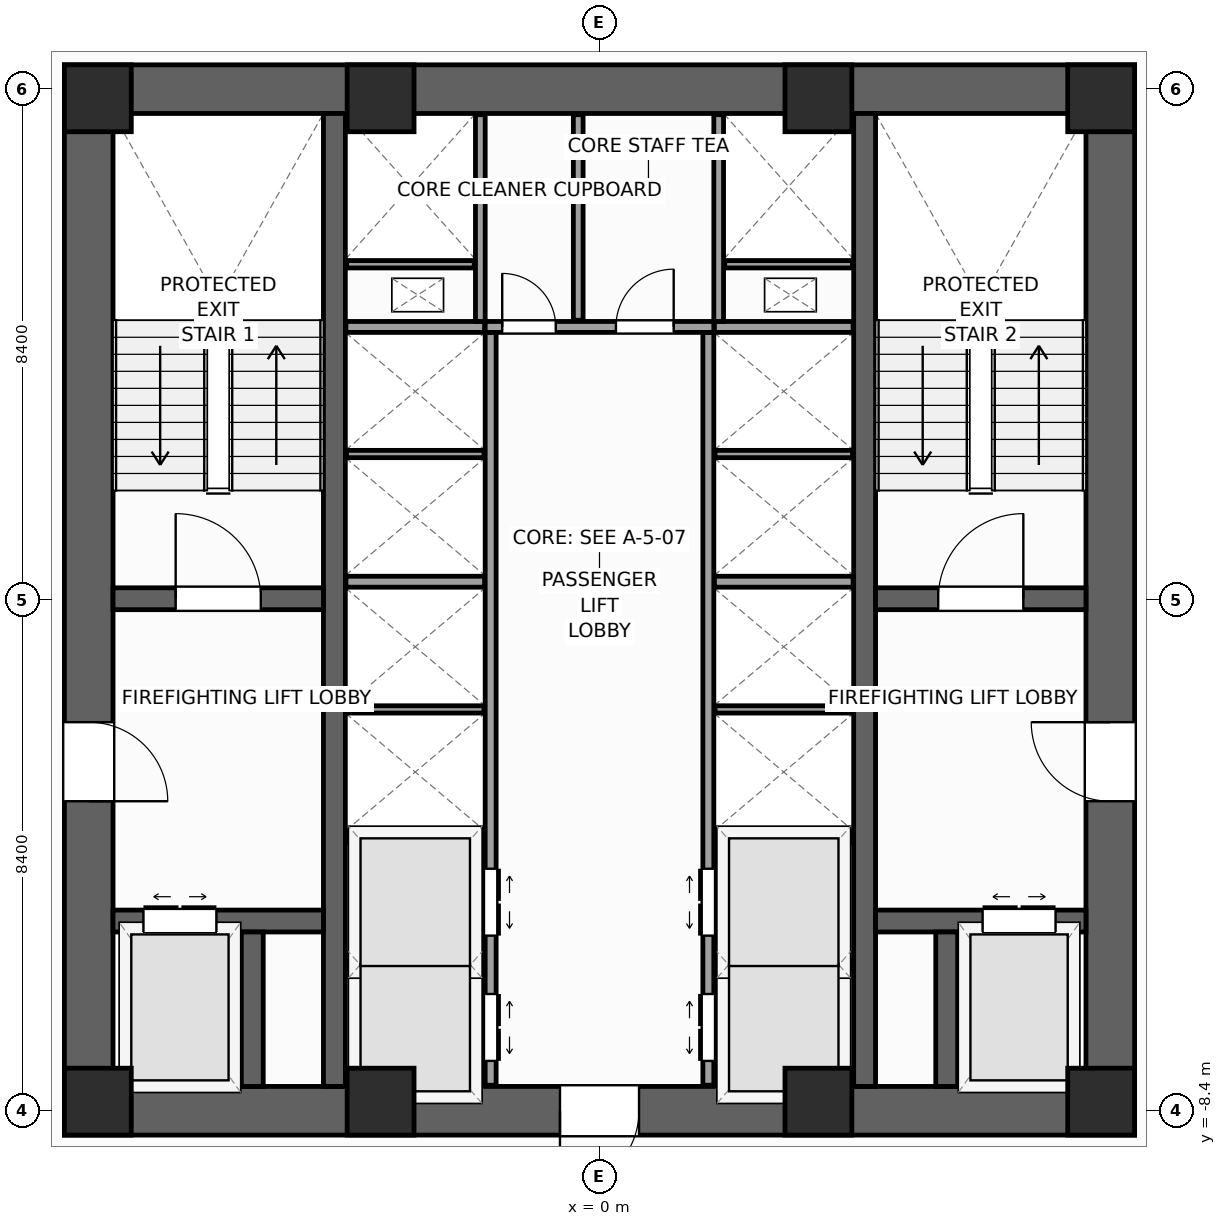
"""IFC4 building model, lengths in metres.
Left out: names, types, materials, properties, quantities, classifications, styles, units other than length and angle.
Written with IfcOpenShell. Run it as: python <this file> out.ifc"""

import sys

from ifc_helpers import new_model, si_unit, direction, frame, frame_2d, origin, origin_2d, place, context, subcontext, project, spatial, rectangle, extrude, source, transform, mapped, element, fill, save


model = new_model("IFC4")
c1 = context("Model", 3, precision=1e-05, world=origin(), true_north=direction((0.0, 1.0)))
c2 = subcontext(c1, "Body", "Model", "MODEL_VIEW")
j1 = project(units=[si_unit("LENGTHUNIT", "METRE"), si_unit("PLANEANGLEUNIT", "RADIAN")], contexts=[c1])
p1 = place(None, origin())
s1 = spatial("IfcSite", under=j1, at=p1, CompositionType="ELEMENT")
p2 = place(p1, origin())
s2 = spatial("IfcBuilding", under=s1, at=p2, CompositionType="ELEMENT")
p3 = place(p2, frame((0.0, 0.0, 74.0)))
s3 = spatial("IfcBuildingStorey", under=s2, at=p3, CompositionType="ELEMENT", Elevation=74.0)
p4 = place(p3, frame((-8.8, -8.4, 0.0), z_axis=(0.0, 0.0, 1.0), x_axis=(1.0, 0.0, 0.0)))
e1 = element("IfcWall", 1, at=p4, inside=s3, PredefinedType="SHEAR", context=c2, shape_type="SweptSolid", body=[
    extrude(rectangle(XDim=17.6, YDim=0.8, at=frame_2d((8.8, 0.0))), origin(), (0.0, 0.0, 1.0), 4.0),
])
p5 = place(p4, frame((8.15, 0.0, 0.0)))
e2 = element("IfcOpeningElement", 2, at=p5, cuts=e1, PredefinedType="OPENING", context=c2, shape_type="SweptSolid", body=[
    extrude(rectangle(XDim=1.3, YDim=2.2, at=frame_2d((0.65, 1.1))), frame((0.0, 0.41, 0.0), z_axis=(0.0, -1.0, 0.0), x_axis=(1.0, 0.0, 0.0)), (0.0, 0.0, 1.0), 0.82),
])
p6 = place(p3, frame((-8.8, 8.4, 0.0), z_axis=(0.0, 0.0, 1.0), x_axis=(1.0, 0.0, 0.0)))
e3 = element("IfcWall", 3, at=p6, inside=s3, PredefinedType="SHEAR", context=c2, shape_type="SweptSolid", body=[
    extrude(rectangle(XDim=17.6, YDim=0.8, at=frame_2d((8.8, 0.0))), origin(), (0.0, 0.0, 1.0), 4.0),
])
p7 = place(p3, frame((-8.4, -8.0, 0.0), z_axis=(0.0, 0.0, 1.0), x_axis=(0.0, 1.0, 0.0)))
e4 = element("IfcWall", 4, at=p7, inside=s3, PredefinedType="SHEAR", context=c2, shape_type="SweptSolid", body=[
    extrude(rectangle(XDim=16.0, YDim=0.8, at=frame_2d((8.0, 0.0))), origin(), (0.0, 0.0, 1.0), 4.0),
])
p8 = place(p7, frame((4.69, 0.0, 0.0)))
e5 = element("IfcOpeningElement", 5, at=p8, cuts=e4, PredefinedType="OPENING", context=c2, shape_type="SweptSolid", body=[
    extrude(rectangle(XDim=1.3, YDim=2.2, at=frame_2d((0.65, 1.1))), frame((0.0, 0.41, 0.0), z_axis=(0.0, -1.0, 0.0), x_axis=(1.0, 0.0, 0.0)), (0.0, 0.0, 1.0), 0.82),
])
p9 = place(p3, frame((8.4, -8.0, 0.0), z_axis=(0.0, 0.0, 1.0), x_axis=(0.0, 1.0, 0.0)))
e6 = element("IfcWall", 6, at=p9, inside=s3, PredefinedType="SHEAR", context=c2, shape_type="SweptSolid", body=[
    extrude(rectangle(XDim=16.0, YDim=0.8, at=frame_2d((8.0, 0.0))), origin(), (0.0, 0.0, 1.0), 4.0),
])
p10 = place(p9, frame((4.69, 0.0, 0.0)))
e7 = element("IfcOpeningElement", 7, at=p10, cuts=e6, PredefinedType="OPENING", context=c2, shape_type="SweptSolid", body=[
    extrude(rectangle(XDim=1.3, YDim=2.2, at=frame_2d((0.65, 1.1))), frame((0.0, 0.41, 0.0), z_axis=(0.0, -1.0, 0.0), x_axis=(1.0, 0.0, 0.0)), (0.0, 0.0, 1.0), 0.82),
])
for number, where, z_axis, x_axis in (
    (8, (-4.36, -8.0, 0.0), (0.0, 0.0, 1.0), (0.0, 1.0, 0.0)),
    (9, (4.36, -8.0, 0.0), (0.0, 0.0, 1.0), (0.0, 1.0, 0.0)),
):
    element("IfcWall", number, at=place(p3, frame(where, z_axis=z_axis, x_axis=x_axis)), inside=s3, PredefinedType="SHEAR", context=c2, shape_type="SweptSolid", body=[
        extrude(rectangle(XDim=16.0, YDim=0.36, at=frame_2d((8.0, 0.0))), origin(), (0.0, 0.0, 1.0), 4.0),
    ])
p11 = place(p3, frame((-8.0, 0.02, 0.0), z_axis=(0.0, 0.0, 1.0), x_axis=(1.0, 0.0, 0.0)))
e10 = element("IfcWall", 10, at=p11, inside=s3, PredefinedType="SHEAR", context=c2, shape_type="SweptSolid", body=[
    extrude(rectangle(XDim=3.46, YDim=0.36, at=frame_2d((1.73, 0.0))), origin(), (0.0, 0.0, 1.0), 4.0),
])
p12 = place(p11, frame((1.03, 0.0, 0.0)))
e11 = element("IfcOpeningElement", 11, at=p12, cuts=e10, PredefinedType="OPENING", context=c2, shape_type="SweptSolid", body=[
    extrude(rectangle(XDim=1.4, YDim=2.2, at=frame_2d((0.7, 1.1))), frame((0.0, 0.19, 0.0), z_axis=(0.0, -1.0, 0.0), x_axis=(1.0, 0.0, 0.0)), (0.0, 0.0, 1.0), 0.38),
])
p13 = place(p3, frame((4.54, 0.02, 0.0), z_axis=(0.0, 0.0, 1.0), x_axis=(1.0, 0.0, 0.0)))
e12 = element("IfcWall", 12, at=p13, inside=s3, PredefinedType="SHEAR", context=c2, shape_type="SweptSolid", body=[
    extrude(rectangle(XDim=3.46, YDim=0.36, at=frame_2d((1.73, 0.0))), origin(), (0.0, 0.0, 1.0), 4.0),
])
p14 = place(p13, frame((1.03, 0.0, 0.0)))
e13 = element("IfcOpeningElement", 13, at=p14, cuts=e12, PredefinedType="OPENING", context=c2, shape_type="SweptSolid", body=[
    extrude(rectangle(XDim=1.4, YDim=2.2, at=frame_2d((0.7, 1.1))), frame((0.0, 0.19, 0.0), z_axis=(0.0, -1.0, 0.0), x_axis=(1.0, 0.0, 0.0)), (0.0, 0.0, 1.0), 0.38),
])
p15 = place(p3, frame((-8.0, -5.28, 0.0), z_axis=(0.0, 0.0, 1.0), x_axis=(1.0, 0.0, 0.0)))
e14 = element("IfcWall", 14, at=p15, inside=s3, PredefinedType="SHEAR", context=c2, shape_type="SweptSolid", body=[
    extrude(rectangle(XDim=3.46, YDim=0.36, at=frame_2d((1.73, 0.0))), origin(), (0.0, 0.0, 1.0), 4.0),
])
p16 = place(p15, frame((0.5, 0.0, 0.0)))
e15 = element("IfcOpeningElement", 15, at=p16, cuts=e14, PredefinedType="OPENING", context=c2, shape_type="SweptSolid", body=[
    extrude(rectangle(XDim=1.2, YDim=2.25, at=frame_2d((0.6, 1.125))), frame((0.0, 0.19, 0.0), z_axis=(0.0, -1.0, 0.0), x_axis=(1.0, 0.0, 0.0)), (0.0, 0.0, 1.0), 0.38),
])
p17 = place(p3, frame((4.54, -5.28, 0.0), z_axis=(0.0, 0.0, 1.0), x_axis=(1.0, 0.0, 0.0)))
e16 = element("IfcWall", 16, at=p17, inside=s3, PredefinedType="SHEAR", context=c2, shape_type="SweptSolid", body=[
    extrude(rectangle(XDim=3.46, YDim=0.36, at=frame_2d((1.73, 0.0))), origin(), (0.0, 0.0, 1.0), 4.0),
])
p18 = place(p17, frame((1.76, 0.0, 0.0)))
e17 = element("IfcOpeningElement", 17, at=p18, cuts=e16, PredefinedType="OPENING", context=c2, shape_type="SweptSolid", body=[
    extrude(rectangle(XDim=1.2, YDim=2.25, at=frame_2d((0.6, 1.125))), frame((0.0, 0.19, 0.0), z_axis=(0.0, -1.0, 0.0), x_axis=(1.0, 0.0, 0.0)), (0.0, 0.0, 1.0), 0.38),
])
for number, where, z_axis, x_axis in (
    (18, (-5.71, -8.0, 0.0), (0.0, 0.0, 1.0), (0.0, 1.0, 0.0)),
    (19, (5.71, -8.0, 0.0), (0.0, 0.0, 1.0), (0.0, 1.0, 0.0)),
):
    element("IfcWall", number, at=place(p3, frame(where, z_axis=z_axis, x_axis=x_axis)), inside=s3, PredefinedType="SHEAR", context=c2, shape_type="SweptSolid", body=[
        extrude(rectangle(XDim=2.54, YDim=0.36, at=frame_2d((1.27, 0.0))), origin(), (0.0, 0.0, 1.0), 4.0),
    ])
m1 = source(origin(), c2, "Body", "SweptSolid", [
    extrude(rectangle(XDim=1.1, YDim=1.1, at=origin_2d()), origin(), (0.0, 0.0, 1.0), 4.0),
])
for number, where, z_axis, x_axis in (
    (20, (-8.25, -8.25, 0.0), (0.0, 0.0, 1.0), (1.0, 0.0, 0.0)),
    (21, (8.25, -8.25, 0.0), (0.0, 0.0, 1.0), (1.0, 0.0, 0.0)),
    (22, (8.25, 8.25, 0.0), (0.0, 0.0, 1.0), (1.0, 0.0, 0.0)),
    (23, (-8.25, 8.25, 0.0), (0.0, 0.0, 1.0), (1.0, 0.0, 0.0)),
    (24, (-3.6, -8.25, 0.0), (0.0, 0.0, 1.0), (1.0, 0.0, 0.0)),
    (25, (3.6, -8.25, 0.0), (0.0, 0.0, 1.0), (1.0, 0.0, 0.0)),
    (26, (-3.6, 8.25, 0.0), (0.0, 0.0, 1.0), (1.0, 0.0, 0.0)),
    (27, (3.6, 8.25, 0.0), (0.0, 0.0, 1.0), (1.0, 0.0, 0.0)),
):
    element("IfcColumn", number, at=place(p3, frame(where, z_axis=z_axis, x_axis=x_axis)), inside=s3, PredefinedType="PILASTER", context=c2, shape_type="MappedRepresentation", body=[
        mapped(m1, transform((0.0, 0.0, 0.0), scale=1.0)),
    ])
p19 = place(p3, frame((-1.79, -7.98, 0.0), z_axis=(0.0, 0.0, 1.0), x_axis=(0.0, 1.0, 0.0)))
e28 = element("IfcWall", 28, at=p19, inside=s3, PredefinedType="PARTITIONING", context=c2, shape_type="SweptSolid", body=[
    extrude(rectangle(XDim=12.38, YDim=0.18, at=frame_2d((6.19, 0.0))), origin(), (0.0, 0.0, 1.0), 3.6),
])
p20 = place(p19, frame((0.4, 0.0, 0.0)))
e29 = element("IfcOpeningElement", 29, at=p20, cuts=e28, PredefinedType="OPENING", context=c2, shape_type="SweptSolid", body=[
    extrude(rectangle(XDim=1.1, YDim=2.2, at=frame_2d((0.55, 1.1))), frame((0.0, 0.1, 0.0), z_axis=(0.0, -1.0, 0.0), x_axis=(1.0, 0.0, 0.0)), (0.0, 0.0, 1.0), 0.2),
])
p21 = place(p19, frame((2.46, 0.0, 0.0)))
e30 = element("IfcOpeningElement", 30, at=p21, cuts=e28, PredefinedType="OPENING", context=c2, shape_type="SweptSolid", body=[
    extrude(rectangle(XDim=1.1, YDim=2.2, at=frame_2d((0.55, 1.1))), frame((0.0, 0.1, 0.0), z_axis=(0.0, -1.0, 0.0), x_axis=(1.0, 0.0, 0.0)), (0.0, 0.0, 1.0), 0.2),
])
p22 = place(p3, frame((1.79, -7.98, 0.0), z_axis=(0.0, 0.0, 1.0), x_axis=(0.0, 1.0, 0.0)))
e31 = element("IfcWall", 31, at=p22, inside=s3, PredefinedType="PARTITIONING", context=c2, shape_type="SweptSolid", body=[
    extrude(rectangle(XDim=12.38, YDim=0.18, at=frame_2d((6.19, 0.0))), origin(), (0.0, 0.0, 1.0), 3.6),
])
p23 = place(p22, frame((0.4, 0.0, 0.0)))
e32 = element("IfcOpeningElement", 32, at=p23, cuts=e31, PredefinedType="OPENING", context=c2, shape_type="SweptSolid", body=[
    extrude(rectangle(XDim=1.1, YDim=2.2, at=frame_2d((0.55, 1.1))), frame((0.0, 0.1, 0.0), z_axis=(0.0, -1.0, 0.0), x_axis=(1.0, 0.0, 0.0)), (0.0, 0.0, 1.0), 0.2),
])
p24 = place(p22, frame((2.46, 0.0, 0.0)))
e33 = element("IfcOpeningElement", 33, at=p24, cuts=e31, PredefinedType="OPENING", context=c2, shape_type="SweptSolid", body=[
    extrude(rectangle(XDim=1.1, YDim=2.2, at=frame_2d((0.55, 1.1))), frame((0.0, 0.1, 0.0), z_axis=(0.0, -1.0, 0.0), x_axis=(1.0, 0.0, 0.0)), (0.0, 0.0, 1.0), 0.2),
])
p25 = place(p3, frame((-1.88, 4.49, 0.0), z_axis=(0.0, 0.0, 1.0), x_axis=(1.0, 0.0, 0.0)))
e34 = element("IfcWall", 34, at=p25, inside=s3, PredefinedType="PARTITIONING", context=c2, shape_type="SweptSolid", body=[
    extrude(rectangle(XDim=3.76, YDim=0.18, at=frame_2d((1.88, 0.0))), origin(), (0.0, 0.0, 1.0), 3.6),
])
p26 = place(p25, frame((0.28, 0.0, 0.0)))
e35 = element("IfcOpeningElement", 35, at=p26, cuts=e34, PredefinedType="OPENING", context=c2, shape_type="SweptSolid", body=[
    extrude(rectangle(XDim=0.88, YDim=2.1, at=frame_2d((0.44, 1.05))), frame((0.0, 0.1, 0.0), z_axis=(0.0, -1.0, 0.0), x_axis=(1.0, 0.0, 0.0)), (0.0, 0.0, 1.0), 0.2),
])
p27 = place(p25, frame((2.15, 0.0, 0.0)))
e36 = element("IfcOpeningElement", 36, at=p27, cuts=e34, PredefinedType="OPENING", context=c2, shape_type="SweptSolid", body=[
    extrude(rectangle(XDim=0.95, YDim=2.1, at=frame_2d((0.475, 1.05))), frame((0.0, 0.1, 0.0), z_axis=(0.0, -1.0, 0.0), x_axis=(1.0, 0.0, 0.0)), (0.0, 0.0, 1.0), 0.2),
])
for number, where, z_axis, x_axis in (
    (37, (-4.17, -3.9, 0.0), (0.0, 0.0, 1.0), (1.0, 0.0, 0.0)),
    (38, (1.89, -3.9, 0.0), (0.0, 0.0, 1.0), (1.0, 0.0, 0.0)),
    (39, (-4.17, 0.3, 0.0), (0.0, 0.0, 1.0), (1.0, 0.0, 0.0)),
    (40, (1.89, 0.3, 0.0), (0.0, 0.0, 1.0), (1.0, 0.0, 0.0)),
    (41, (-4.17, 4.49, 0.0), (0.0, 0.0, 1.0), (1.0, 0.0, 0.0)),
    (42, (1.89, 4.49, 0.0), (0.0, 0.0, 1.0), (1.0, 0.0, 0.0)),
):
    element("IfcWall", number, at=place(p3, frame(where, z_axis=z_axis, x_axis=x_axis)), inside=s3, PredefinedType="PARTITIONING", context=c2, shape_type="SweptSolid", body=[
        extrude(rectangle(XDim=2.28, YDim=0.18, at=frame_2d((1.14, 0.0))), origin(), (0.0, 0.0, 1.0), 3.6),
    ])
for number, where, z_axis, x_axis in (
    (43, (-4.16, -6.0, 0.0), (0.0, 0.0, 1.0), (1.0, 0.0, 0.0)),
    (44, (1.9, -6.0, 0.0), (0.0, 0.0, 1.0), (1.0, 0.0, 0.0)),
    (45, (-4.16, -1.8, 0.0), (0.0, 0.0, 1.0), (1.0, 0.0, 0.0)),
    (46, (1.9, -1.8, 0.0), (0.0, 0.0, 1.0), (1.0, 0.0, 0.0)),
    (47, (-4.16, 2.4, 0.0), (0.0, 0.0, 1.0), (1.0, 0.0, 0.0)),
    (48, (1.9, 2.4, 0.0), (0.0, 0.0, 1.0), (1.0, 0.0, 0.0)),
):
    element("IfcWall", number, at=place(p3, frame(where, z_axis=z_axis, x_axis=x_axis)), inside=s3, PredefinedType="PARTITIONING", context=c2, shape_type="SweptSolid", body=[
        extrude(rectangle(XDim=2.26, YDim=0.12, at=frame_2d((1.13, 0.0))), origin(), (0.0, 0.0, 1.0), 3.6),
    ])
for number, where, z_axis, x_axis in (
    (49, (-1.96, 4.58, 0.0), (0.0, 0.0, 1.0), (0.0, 1.0, 0.0)),
    (50, (1.96, 4.58, 0.0), (0.0, 0.0, 1.0), (0.0, 1.0, 0.0)),
):
    element("IfcWall", number, at=place(p3, frame(where, z_axis=z_axis, x_axis=x_axis)), inside=s3, PredefinedType="PARTITIONING", context=c2, shape_type="SweptSolid", body=[
        extrude(rectangle(XDim=3.4, YDim=0.16, at=frame_2d((1.7, 0.0))), origin(), (0.0, 0.0, 1.0), 3.6),
    ])
for number, where, z_axis, x_axis in (
    (51, (-4.16, 5.52, 0.0), (0.0, 0.0, 1.0), (1.0, 0.0, 0.0)),
    (52, (2.06, 5.52, 0.0), (0.0, 0.0, 1.0), (1.0, 0.0, 0.0)),
):
    element("IfcWall", number, at=place(p3, frame(where, z_axis=z_axis, x_axis=x_axis)), inside=s3, PredefinedType="PARTITIONING", context=c2, shape_type="SweptSolid", body=[
        extrude(rectangle(XDim=2.1, YDim=0.12, at=frame_2d((1.05, 0.0))), origin(), (0.0, 0.0, 1.0), 3.6),
    ])
p28 = place(p3, frame((-0.35, 4.6, 0.0), z_axis=(0.0, 0.0, 1.0), x_axis=(0.0, 1.0, 0.0)))
e53 = element("IfcWall", 53, at=p28, inside=s3, PredefinedType="PARTITIONING", context=c2, shape_type="SweptSolid", body=[
    extrude(rectangle(XDim=3.38, YDim=0.16, at=frame_2d((1.69, 0.0))), origin(), (0.0, 0.0, 1.0), 3.6),
])
m2 = source(origin(), c2, "Body", "SweptSolid", [
    extrude(rectangle(XDim=1.4, YDim=2.2, at=frame_2d((0.7, 1.1))), frame((0.0, 0.025, 0.0), z_axis=(0.0, -1.0, 0.0), x_axis=(1.0, 0.0, 0.0)), (0.0, 0.0, 1.0), 0.05),
])
p29 = place(p12, origin())
e54 = element("IfcDoor", 54, at=p29, inside=s3, OperationType="SINGLE_SWING_LEFT", PredefinedType="DOOR", context=c2, shape_type="MappedRepresentation", body=[
    mapped(m2, transform((0.0, 0.0, 0.0), scale=1.0)),
])
fill(e11, e54)
p30 = place(p14, origin())
e55 = element("IfcDoor", 55, at=p30, inside=s3, OperationType="SINGLE_SWING_RIGHT", PredefinedType="DOOR", context=c2, shape_type="MappedRepresentation", body=[
    mapped(m2, transform((0.0, 0.0, 0.0), scale=1.0)),
])
fill(e13, e55)
m3 = source(origin(), c2, "Body", "SweptSolid", [
    extrude(rectangle(XDim=1.3, YDim=2.2, at=frame_2d((0.65, 1.1))), frame((0.0, 0.025, 0.0), z_axis=(0.0, -1.0, 0.0), x_axis=(1.0, 0.0, 0.0)), (0.0, 0.0, 1.0), 0.05),
])
p31 = place(p8, frame((1.3, 0.0, 0.0), z_axis=(0.0, 0.0, 1.0), x_axis=(-1.0, 0.0, 0.0)))
e56 = element("IfcDoor", 56, at=p31, inside=s3, OperationType="SINGLE_SWING_LEFT", PredefinedType="DOOR", context=c2, shape_type="MappedRepresentation", body=[
    mapped(m3, transform((0.0, 0.0, 0.0), scale=1.0)),
])
fill(e5, e56)
p32 = place(p10, origin())
e57 = element("IfcDoor", 57, at=p32, inside=s3, OperationType="SINGLE_SWING_RIGHT", PredefinedType="DOOR", context=c2, shape_type="MappedRepresentation", body=[
    mapped(m3, transform((0.0, 0.0, 0.0), scale=1.0)),
])
fill(e7, e57)
p33 = place(p5, frame((1.3, 0.0, 0.0), z_axis=(0.0, 0.0, 1.0), x_axis=(-1.0, 0.0, 0.0)))
e58 = element("IfcDoor", 58, at=p33, inside=s3, OperationType="SINGLE_SWING_LEFT", PredefinedType="DOOR", context=c2, shape_type="MappedRepresentation", body=[
    mapped(m3, transform((0.0, 0.0, 0.0), scale=1.0)),
])
fill(e2, e58)
m4 = source(origin(), c2, "Body", "SweptSolid", [
    extrude(rectangle(XDim=1.2, YDim=2.25, at=frame_2d((0.6, 1.125))), frame((0.0, 0.025, 0.0), z_axis=(0.0, -1.0, 0.0), x_axis=(1.0, 0.0, 0.0)), (0.0, 0.0, 1.0), 0.05),
])
p34 = place(p16, origin())
e59 = element("IfcDoor", 59, at=p34, inside=s3, OperationType="DOUBLE_DOOR_SLIDING", PredefinedType="DOOR", context=c2, shape_type="MappedRepresentation", body=[
    mapped(m4, transform((0.0, 0.0, 0.0), scale=1.0)),
])
fill(e15, e59)
p35 = place(p18, origin())
e60 = element("IfcDoor", 60, at=p35, inside=s3, OperationType="DOUBLE_DOOR_SLIDING", PredefinedType="DOOR", context=c2, shape_type="MappedRepresentation", body=[
    mapped(m4, transform((0.0, 0.0, 0.0), scale=1.0)),
])
fill(e17, e60)
m5 = source(origin(), c2, "Body", "SweptSolid", [
    extrude(rectangle(XDim=1.1, YDim=2.2, at=frame_2d((0.55, 1.1))), frame((0.0, 0.025, 0.0), z_axis=(0.0, -1.0, 0.0), x_axis=(1.0, 0.0, 0.0)), (0.0, 0.0, 1.0), 0.05),
])
p36 = place(p20, frame((1.1, 0.0, 0.0), z_axis=(0.0, 0.0, 1.0), x_axis=(-1.0, 0.0, 0.0)))
e61 = element("IfcDoor", 61, at=p36, inside=s3, OperationType="DOUBLE_DOOR_SLIDING", PredefinedType="DOOR", context=c2, shape_type="MappedRepresentation", body=[
    mapped(m5, transform((0.0, 0.0, 0.0), scale=1.0)),
])
fill(e29, e61)
p37 = place(p21, frame((1.1, 0.0, 0.0), z_axis=(0.0, 0.0, 1.0), x_axis=(-1.0, 0.0, 0.0)))
e62 = element("IfcDoor", 62, at=p37, inside=s3, OperationType="DOUBLE_DOOR_SLIDING", PredefinedType="DOOR", context=c2, shape_type="MappedRepresentation", body=[
    mapped(m5, transform((0.0, 0.0, 0.0), scale=1.0)),
])
fill(e30, e62)
p38 = place(p23, origin())
e63 = element("IfcDoor", 63, at=p38, inside=s3, OperationType="DOUBLE_DOOR_SLIDING", PredefinedType="DOOR", context=c2, shape_type="MappedRepresentation", body=[
    mapped(m5, transform((0.0, 0.0, 0.0), scale=1.0)),
])
fill(e32, e63)
p39 = place(p24, origin())
e64 = element("IfcDoor", 64, at=p39, inside=s3, OperationType="DOUBLE_DOOR_SLIDING", PredefinedType="DOOR", context=c2, shape_type="MappedRepresentation", body=[
    mapped(m5, transform((0.0, 0.0, 0.0), scale=1.0)),
])
fill(e33, e64)
m6 = source(origin(), c2, "Body", "SweptSolid", [
    extrude(rectangle(XDim=0.88, YDim=2.1, at=frame_2d((0.44, 1.05))), frame((0.0, 0.025, 0.0), z_axis=(0.0, -1.0, 0.0), x_axis=(1.0, 0.0, 0.0)), (0.0, 0.0, 1.0), 0.05),
])
p40 = place(p26, origin())
e65 = element("IfcDoor", 65, at=p40, inside=s3, OperationType="SINGLE_SWING_LEFT", PredefinedType="DOOR", context=c2, shape_type="MappedRepresentation", body=[
    mapped(m6, transform((0.0, 0.0, 0.0), scale=1.0)),
])
fill(e35, e65)
m7 = source(origin(), c2, "Body", "SweptSolid", [
    extrude(rectangle(XDim=0.95, YDim=2.1, at=frame_2d((0.475, 1.05))), frame((0.0, 0.025, 0.0), z_axis=(0.0, -1.0, 0.0), x_axis=(1.0, 0.0, 0.0)), (0.0, 0.0, 1.0), 0.05),
])
p41 = place(p27, origin())
e66 = element("IfcDoor", 66, at=p41, inside=s3, OperationType="SINGLE_SWING_RIGHT", PredefinedType="DOOR", context=c2, shape_type="MappedRepresentation", body=[
    mapped(m7, transform((0.0, 0.0, 0.0), scale=1.0)),
])
fill(e36, e66)
save(model, sys.argv[1])
